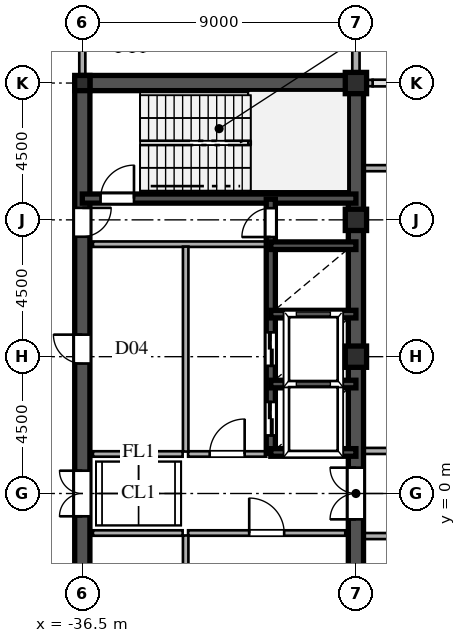
"""IFC4 building model, lengths in metres.
Left out: names, types, materials, properties, quantities, classifications, styles, units other than length and angle.
Written with IfcOpenShell. Run it as: python <this file> out.ifc"""

import sys

from ifc_helpers import new_model, si_unit, direction, frame, frame_2d, origin, origin_2d, place, context, subcontext, project, spatial, rectangle, hollow_rectangle, i_section, extrude, source, transform, mapped, element, fill, save


model = new_model("IFC4")
c1 = context("Model", 3, precision=1e-05, world=origin(), true_north=direction((0.0, 1.0)))
c2 = subcontext(c1, "Body", "Model", "MODEL_VIEW")
j1 = project(units=[si_unit("LENGTHUNIT", "METRE"), si_unit("PLANEANGLEUNIT", "RADIAN")], contexts=[c1])
p1 = place(None, origin())
s1 = spatial("IfcSite", under=j1, at=p1, CompositionType="ELEMENT")
p2 = place(p1, origin())
s2 = spatial("IfcBuilding", under=s1, at=p2, CompositionType="ELEMENT")
p3 = place(p2, frame((0.0, 0.0, 229.8)))
s3 = spatial("IfcBuildingStorey", under=s2, at=p3, CompositionType="ELEMENT", Elevation=229.8)
m1 = source(origin(), c2, "Body", "SweptSolid", [
    extrude(hollow_rectangle(XDim=0.7, YDim=0.7, WallThickness=0.03, at=origin_2d()), origin(), (0.0, 0.0, 1.0), 4.8),
])
for number, where, z_axis, x_axis in (
    (1, (-27.5, 4.5, 0.0), (0.0, 0.0, 1.0), (1.0, 0.0, 0.0)),
    (2, (-27.5, 9.0, 0.0), (0.0, 0.0, 1.0), (1.0, 0.0, 0.0)),
    (3, (-27.5, 13.5, 0.0), (0.0, 0.0, 1.0), (1.0, 0.0, 0.0)),
):
    element("IfcColumn", number, at=place(p3, frame(where, z_axis=z_axis, x_axis=x_axis)), inside=s3, PredefinedType="COLUMN", context=c2, shape_type="MappedRepresentation", body=[
        mapped(m1, transform((0.0, 0.0, 0.0), scale=1.0)),
    ])
m2 = source(origin(), c2, "Body", "SweptSolid", [
    extrude(i_section(OverallWidth=0.5, OverallDepth=0.5, WebThickness=0.02, FlangeThickness=0.032, at=origin_2d()), origin(), (0.0, 0.0, 1.0), 4.8),
])
p4 = place(p3, frame((-36.5, 13.5, 0.0), z_axis=(0.0, 0.0, 1.0), x_axis=(1.0, 0.0, 0.0)))
e4 = element("IfcColumn", 4, at=p4, inside=s3, PredefinedType="COLUMN", context=c2, shape_type="MappedRepresentation", body=[
    mapped(m2, transform((0.0, 0.0, 0.0), scale=1.0)),
])
p5 = place(p3, frame((-27.5, 13.755, 0.0), z_axis=(0.0, 0.0, 1.0), x_axis=(0.0, 1.0, 0.0)))
e5 = element("IfcWall", 5, at=p5, inside=s3, PredefinedType="SOLIDWALL", context=c2, shape_type="SweptSolid", body=[
    extrude(rectangle(XDim=0.62, YDim=0.24, at=frame_2d((0.31, 0.0))), origin(), (0.0, 0.0, 1.0), 4.04),
])
p6 = place(p3, frame((-27.5, 14.375, 0.0), z_axis=(0.0, 0.0, 1.0), x_axis=(0.0, 1.0, 0.0)))
e6 = element("IfcWall", 6, at=p6, inside=s3, PredefinedType="SOLIDWALL", context=c2, shape_type="SweptSolid", body=[
    extrude(rectangle(XDim=1.605, YDim=0.24, at=frame_2d((0.803, 0.0))), origin(), (0.0, 0.0, 1.0), 4.54),
])
p7 = place(p3, frame((-27.49, 13.5, 0.0), z_axis=(0.0, 0.0, 1.0), x_axis=(1.0, 0.0, 0.0)))
e7 = element("IfcWall", 7, at=p7, inside=s3, PredefinedType="SOLIDWALL", context=c2, shape_type="SweptSolid", body=[
    extrude(rectangle(XDim=0.54, YDim=0.21, at=frame_2d((0.27, 0.0))), origin(), (0.0, 0.0, 1.0), 2.54),
])
for number, where, z_axis, x_axis in (
    (8, (-27.5, -13.5, 0.0), (0.0, 0.0, 1.0), (0.0, 1.0, 0.0)),
    (9, (-27.5, 1.3, 0.0), (0.0, 0.0, 1.0), (0.0, 1.0, 0.0)),
):
    element("IfcWall", number, at=place(p3, frame(where, z_axis=z_axis, x_axis=x_axis)), inside=s3, PredefinedType="SHEAR", context=c2, shape_type="SweptSolid", body=[
        extrude(rectangle(XDim=12.2, YDim=0.5, at=frame_2d((6.1, 0.0))), origin(), (0.0, 0.0, 1.0), 4.54),
    ])
p8 = place(p3, frame((-27.5, -1.3, 0.0), z_axis=(0.0, 0.0, 1.0), x_axis=(0.0, 1.0, 0.0)))
e10 = element("IfcWall", 10, at=p8, inside=s3, PredefinedType="SHEAR", context=c2, shape_type="SweptSolid", body=[
    extrude(rectangle(XDim=2.6, YDim=0.5, at=frame_2d((1.3, 0.0))), origin(), (0.0, 0.0, 1.0), 4.54),
])
p9 = place(p8, frame((0.45, 0.0, 0.0)))
e11 = element("IfcOpeningElement", 11, at=p9, cuts=e10, PredefinedType="OPENING", context=c2, shape_type="SweptSolid", body=[
    extrude(rectangle(XDim=1.7, YDim=2.35, at=frame_2d((0.85, 1.175))), frame((0.0, 0.26, 0.0), z_axis=(0.0, -1.0, 0.0), x_axis=(1.0, 0.0, 0.0)), (0.0, 0.0, 1.0), 0.52),
])
p10 = place(p3, frame((-36.5, 13.5, 0.0), z_axis=(0.0, 0.0, 1.0), x_axis=(1.0, 0.0, 0.0)))
e12 = element("IfcWall", 12, at=p10, inside=s3, PredefinedType="SHEAR", context=c2, shape_type="SweptSolid", body=[
    extrude(rectangle(XDim=9.0, YDim=0.5, at=frame_2d((4.5, 0.0))), origin(), (0.0, 0.0, 1.0), 4.54),
])
p11 = place(p3, frame((-36.5, -1.3, 0.0), z_axis=(0.0, 0.0, 1.0), x_axis=(0.0, 1.0, 0.0)))
e13 = element("IfcWall", 13, at=p11, inside=s3, PredefinedType="SHEAR", context=c2, shape_type="SweptSolid", body=[
    extrude(rectangle(XDim=2.6, YDim=0.5, at=frame_2d((1.3, 0.0))), origin(), (0.0, 0.0, 1.0), 4.54),
])
p12 = place(p11, frame((0.55, 0.0, 0.0)))
e14 = element("IfcOpeningElement", 14, at=p12, cuts=e13, PredefinedType="OPENING", context=c2, shape_type="SweptSolid", body=[
    extrude(rectangle(XDim=1.5, YDim=2.3, at=frame_2d((0.75, 1.15))), frame((0.0, 0.26, 0.0), z_axis=(0.0, -1.0, 0.0), x_axis=(1.0, 0.0, 0.0)), (0.0, 0.0, 1.0), 0.52),
])
p13 = place(p3, frame((-36.5, 8.2, 0.0), z_axis=(0.0, 0.0, 1.0), x_axis=(0.0, 1.0, 0.0)))
e15 = element("IfcWall", 15, at=p13, inside=s3, PredefinedType="SHEAR", context=c2, shape_type="SweptSolid", body=[
    extrude(rectangle(XDim=5.45, YDim=0.5, at=frame_2d((2.725, 0.0))), origin(), (0.0, 0.0, 1.0), 4.54),
])
p14 = place(p13, frame((0.245, 0.0, 0.0)))
e16 = element("IfcOpeningElement", 16, at=p14, cuts=e15, PredefinedType="OPENING", context=c2, shape_type="SweptSolid", body=[
    extrude(rectangle(XDim=0.95, YDim=2.15, at=frame_2d((0.475, 1.075))), frame((0.0, 0.26, 0.0), z_axis=(0.0, -1.0, 0.0), x_axis=(1.0, 0.0, 0.0)), (0.0, 0.0, 1.0), 0.52),
])
p15 = place(p3, frame((-36.5, -6.5, 0.0), z_axis=(0.0, 0.0, 1.0), x_axis=(0.0, 1.0, 0.0)))
e17 = element("IfcWall", 17, at=p15, inside=s3, PredefinedType="SHEAR", context=c2, shape_type="SweptSolid", body=[
    extrude(rectangle(XDim=5.2, YDim=0.5, at=frame_2d((2.6, 0.0))), origin(), (0.0, 0.0, 1.0), 4.54),
])
p16 = place(p15, frame((2.125, 0.0, 0.0)))
e18 = element("IfcOpeningElement", 18, at=p16, cuts=e17, PredefinedType="OPENING", context=c2, shape_type="SweptSolid", body=[
    extrude(rectangle(XDim=0.95, YDim=2.15, at=frame_2d((0.475, 1.075))), frame((0.0, 0.26, 0.0), z_axis=(0.0, -1.0, 0.0), x_axis=(1.0, 0.0, 0.0)), (0.0, 0.0, 1.0), 0.52),
])
p17 = place(p3, frame((-36.5, 1.3, 0.0), z_axis=(0.0, 0.0, 1.0), x_axis=(0.0, 1.0, 0.0)))
e19 = element("IfcWall", 19, at=p17, inside=s3, PredefinedType="SHEAR", context=c2, shape_type="SweptSolid", body=[
    extrude(rectangle(XDim=6.9, YDim=0.5, at=frame_2d((3.45, 0.0))), origin(), (0.0, 0.0, 1.0), 4.54),
])
p18 = place(p17, frame((2.975, 0.0, 0.0)))
e20 = element("IfcOpeningElement", 20, at=p18, cuts=e19, PredefinedType="OPENING", context=c2, shape_type="SweptSolid", body=[
    extrude(rectangle(XDim=0.95, YDim=2.15, at=frame_2d((0.475, 1.075))), frame((0.0, 0.26, 0.0), z_axis=(0.0, -1.0, 0.0), x_axis=(1.0, 0.0, 0.0)), (0.0, 0.0, 1.0), 0.52),
])
p19 = place(p3, frame((-36.5, 9.7, 0.0), z_axis=(0.0, 0.0, 1.0), x_axis=(1.0, 0.0, 0.0)))
e21 = element("IfcWall", 21, at=p19, inside=s3, PredefinedType="SHEAR", context=c2, shape_type="SweptSolid", body=[
    extrude(rectangle(XDim=9.0, YDim=0.3, at=frame_2d((4.5, 0.0))), origin(), (0.0, 0.0, 1.0), 4.54),
])
p20 = place(p19, frame((0.6, 0.0, 0.0)))
e22 = element("IfcOpeningElement", 22, at=p20, cuts=e21, PredefinedType="OPENING", context=c2, shape_type="SweptSolid", body=[
    extrude(rectangle(XDim=1.1, YDim=2.2, at=frame_2d((0.55, 1.1))), frame((0.0, 0.16, 0.0), z_axis=(0.0, -1.0, 0.0), x_axis=(1.0, 0.0, 0.0)), (0.0, 0.0, 1.0), 0.32),
])
for number, where, z_axis, x_axis in (
    (23, (-30.3, 1.35, 0.0), (0.0, 0.0, 1.0), (1.0, 0.0, 0.0)),
    (24, (-30.3, 3.6, 0.0), (0.0, 0.0, 1.0), (1.0, 0.0, 0.0)),
    (25, (-30.3, 5.9, 0.0), (0.0, 0.0, 1.0), (1.0, 0.0, 0.0)),
    (26, (-30.3, 8.15, 0.0), (0.0, 0.0, 1.0), (1.0, 0.0, 0.0)),
):
    element("IfcWall", number, at=place(p3, frame(where, z_axis=z_axis, x_axis=x_axis)), inside=s3, PredefinedType="SHEAR", context=c2, shape_type="SweptSolid", body=[
        extrude(rectangle(XDim=2.8, YDim=0.25, at=frame_2d((1.4, 0.0))), origin(), (0.0, 0.0, 1.0), 4.54),
    ])
p21 = place(p3, frame((-30.3, 1.32, 0.0), z_axis=(0.0, 0.0, 1.0), x_axis=(0.0, 1.0, 0.0)))
e27 = element("IfcWall", 27, at=p21, inside=s3, PredefinedType="SHEAR", context=c2, shape_type="SweptSolid", body=[
    extrude(rectangle(XDim=2.28, YDim=0.3, at=frame_2d((1.14, 0.0))), origin(), (0.0, 0.0, 1.0), 4.54),
])
p22 = place(p21, frame((0.59, 0.0, 0.0)))
e28 = element("IfcOpeningElement", 28, at=p22, cuts=e27, PredefinedType="OPENING", context=c2, shape_type="SweptSolid", body=[
    extrude(rectangle(XDim=1.1, YDim=2.2, at=frame_2d((0.55, 1.1))), frame((0.0, 0.16, 0.0), z_axis=(0.0, -1.0, 0.0), x_axis=(1.0, 0.0, 0.0)), (0.0, 0.0, 1.0), 0.32),
])
p23 = place(p3, frame((-30.3, 3.6, 0.0), z_axis=(0.0, 0.0, 1.0), x_axis=(0.0, 1.0, 0.0)))
e29 = element("IfcWall", 29, at=p23, inside=s3, PredefinedType="SHEAR", context=c2, shape_type="SweptSolid", body=[
    extrude(rectangle(XDim=2.3, YDim=0.3, at=frame_2d((1.15, 0.0))), origin(), (0.0, 0.0, 1.0), 4.54),
])
p24 = place(p23, frame((0.6, 0.0, 0.0)))
e30 = element("IfcOpeningElement", 30, at=p24, cuts=e29, PredefinedType="OPENING", context=c2, shape_type="SweptSolid", body=[
    extrude(rectangle(XDim=1.1, YDim=2.2, at=frame_2d((0.55, 1.1))), frame((0.0, 0.16, 0.0), z_axis=(0.0, -1.0, 0.0), x_axis=(1.0, 0.0, 0.0)), (0.0, 0.0, 1.0), 0.32),
])
p25 = place(p3, frame((-30.3, 5.9, 0.0), z_axis=(0.0, 0.0, 1.0), x_axis=(0.0, 1.0, 0.0)))
e31 = element("IfcWall", 31, at=p25, inside=s3, PredefinedType="SHEAR", context=c2, shape_type="SweptSolid", body=[
    extrude(rectangle(XDim=2.25, YDim=0.3, at=frame_2d((1.125, 0.0))), origin(), (0.0, 0.0, 1.0), 4.54),
])
p26 = place(p3, frame((-30.3, 8.15, 0.0), z_axis=(0.0, 0.0, 1.0), x_axis=(0.0, 1.0, 0.0)))
e32 = element("IfcWall", 32, at=p26, inside=s3, PredefinedType="SHEAR", context=c2, shape_type="SweptSolid", body=[
    extrude(rectangle(XDim=1.53, YDim=0.3, at=frame_2d((0.765, 0.0))), origin(), (0.0, 0.0, 1.0), 4.54),
])
p27 = place(p26, frame((0.285, 0.0, 0.0)))
e33 = element("IfcOpeningElement", 33, at=p27, cuts=e32, PredefinedType="OPENING", context=c2, shape_type="SweptSolid", body=[
    extrude(rectangle(XDim=0.95, YDim=2.15, at=frame_2d((0.475, 1.075))), frame((0.0, 0.16, 0.0), z_axis=(0.0, -1.0, 0.0), x_axis=(1.0, 0.0, 0.0)), (0.0, 0.0, 1.0), 0.32),
])
p28 = place(p3, frame((-36.15, 8.2, 0.0), z_axis=(0.0, 0.0, 1.0), x_axis=(1.0, 0.0, 0.0)))
e34 = element("IfcWall", 34, at=p28, inside=s3, PredefinedType="PARTITIONING", context=c2, shape_type="SweptSolid", body=[
    extrude(rectangle(XDim=5.7, YDim=0.18, at=frame_2d((2.85, 0.0))), origin(), (0.0, 0.0, 1.0), 4.54),
])
p29 = place(p3, frame((-33.1, -6.42, 0.0), z_axis=(0.0, 0.0, 1.0), x_axis=(0.0, 1.0, 0.0)))
e35 = element("IfcWall", 35, at=p29, inside=s3, PredefinedType="PARTITIONING", context=c2, shape_type="SweptSolid", body=[
    extrude(rectangle(XDim=5.04, YDim=0.18, at=frame_2d((2.52, 0.0))), origin(), (0.0, 0.0, 1.0), 4.54),
])
p30 = place(p3, frame((-33.1, 1.38, 0.0), z_axis=(0.0, 0.0, 1.0), x_axis=(0.0, 1.0, 0.0)))
e36 = element("IfcWall", 36, at=p30, inside=s3, PredefinedType="PARTITIONING", context=c2, shape_type="SweptSolid", body=[
    extrude(rectangle(XDim=6.74, YDim=0.18, at=frame_2d((3.37, 0.0))), origin(), (0.0, 0.0, 1.0), 4.54),
])
p31 = place(p3, frame((-33.02, -1.3, 0.0), z_axis=(0.0, 0.0, 1.0), x_axis=(1.0, 0.0, 0.0)))
e37 = element("IfcWall", 37, at=p31, inside=s3, PredefinedType="PARTITIONING", context=c2, shape_type="SweptSolid", body=[
    extrude(rectangle(XDim=5.17, YDim=0.18, at=frame_2d((2.585, 0.0))), origin(), (0.0, 0.0, 1.0), 4.54),
])
p32 = place(p31, frame((2.01, 0.0, 0.0)))
e38 = element("IfcOpeningElement", 38, at=p32, cuts=e37, PredefinedType="OPENING", context=c2, shape_type="SweptSolid", body=[
    extrude(rectangle(XDim=1.15, YDim=2.2, at=frame_2d((0.575, 1.1))), frame((0.0, 0.1, 0.0), z_axis=(0.0, -1.0, 0.0), x_axis=(1.0, 0.0, 0.0)), (0.0, 0.0, 1.0), 0.2),
])
p33 = place(p3, frame((-33.02, 1.3, 0.0), z_axis=(0.0, 0.0, 1.0), x_axis=(1.0, 0.0, 0.0)))
e39 = element("IfcWall", 39, at=p33, inside=s3, PredefinedType="PARTITIONING", context=c2, shape_type="SweptSolid", body=[
    extrude(rectangle(XDim=2.57, YDim=0.18, at=frame_2d((1.285, 0.0))), origin(), (0.0, 0.0, 1.0), 4.54),
])
p34 = place(p33, frame((0.71, 0.0, 0.0)))
e40 = element("IfcOpeningElement", 40, at=p34, cuts=e39, PredefinedType="OPENING", context=c2, shape_type="SweptSolid", body=[
    extrude(rectangle(XDim=1.15, YDim=2.2, at=frame_2d((0.575, 1.1))), frame((0.0, 0.1, 0.0), z_axis=(0.0, -1.0, 0.0), x_axis=(1.0, 0.0, 0.0)), (0.0, 0.0, 1.0), 0.2),
])
for number, where, z_axis, x_axis in (
    (41, (-36.15, -1.3, 0.0), (0.0, 0.0, 1.0), (1.0, 0.0, 0.0)),
    (42, (-36.15, 1.3, 0.0), (0.0, 0.0, 1.0), (1.0, 0.0, 0.0)),
):
    element("IfcWall", number, at=place(p3, frame(where, z_axis=z_axis, x_axis=x_axis)), inside=s3, PredefinedType="PARTITIONING", context=c2, shape_type="SweptSolid", body=[
        extrude(rectangle(XDim=2.95, YDim=0.18, at=frame_2d((1.475, 0.0))), origin(), (0.0, 0.0, 1.0), 4.54),
    ])
p35 = place(p3, frame((-27.245, -1.4, 0.0), z_axis=(0.0, 0.0, 1.0), x_axis=(1.0, 0.0, 0.0)))
e43 = element("IfcWall", 43, at=p35, inside=s3, PredefinedType="PARTITIONING", context=c2, shape_type="SweptSolid", body=[
    extrude(rectangle(XDim=54.49, YDim=0.2, at=frame_2d((27.245, 0.0))), origin(), (0.0, 0.0, 1.0), 4.54),
])
p36 = place(p35, frame((25.77, 0.0, 0.0)))
e44 = element("IfcOpeningElement", 44, at=p36, cuts=e43, PredefinedType="OPENING", context=c2, shape_type="SweptSolid", body=[
    extrude(rectangle(XDim=1.15, YDim=2.2, at=frame_2d((0.575, 1.1))), frame((0.0, 0.11, 0.0), z_axis=(0.0, -1.0, 0.0), x_axis=(1.0, 0.0, 0.0)), (0.0, 0.0, 1.0), 0.22),
])
p37 = place(p35, frame((17.67, 0.0, 0.0)))
e45 = element("IfcOpeningElement", 45, at=p37, cuts=e43, PredefinedType="OPENING", context=c2, shape_type="SweptSolid", body=[
    extrude(rectangle(XDim=1.15, YDim=2.2, at=frame_2d((0.575, 1.1))), frame((0.0, 0.11, 0.0), z_axis=(0.0, -1.0, 0.0), x_axis=(1.0, 0.0, 0.0)), (0.0, 0.0, 1.0), 0.22),
])
p38 = place(p35, frame((35.17, 0.0, 0.0)))
e46 = element("IfcOpeningElement", 46, at=p38, cuts=e43, PredefinedType="OPENING", context=c2, shape_type="SweptSolid", body=[
    extrude(rectangle(XDim=1.15, YDim=2.2, at=frame_2d((0.575, 1.1))), frame((0.0, 0.11, 0.0), z_axis=(0.0, -1.0, 0.0), x_axis=(1.0, 0.0, 0.0)), (0.0, 0.0, 1.0), 0.22),
])
p39 = place(p3, frame((-27.245, 1.4, 0.0), z_axis=(0.0, 0.0, 1.0), x_axis=(1.0, 0.0, 0.0)))
e47 = element("IfcWall", 47, at=p39, inside=s3, PredefinedType="PARTITIONING", context=c2, shape_type="SweptSolid", body=[
    extrude(rectangle(XDim=54.49, YDim=0.2, at=frame_2d((27.245, 0.0))), origin(), (0.0, 0.0, 1.0), 4.54),
])
p40 = place(p39, frame((25.77, 0.0, 0.0)))
e48 = element("IfcOpeningElement", 48, at=p40, cuts=e47, PredefinedType="OPENING", context=c2, shape_type="SweptSolid", body=[
    extrude(rectangle(XDim=1.15, YDim=2.2, at=frame_2d((0.575, 1.1))), frame((0.0, 0.11, 0.0), z_axis=(0.0, -1.0, 0.0), x_axis=(1.0, 0.0, 0.0)), (0.0, 0.0, 1.0), 0.22),
])
p41 = place(p39, frame((35.17, 0.0, 0.0)))
e49 = element("IfcOpeningElement", 49, at=p41, cuts=e47, PredefinedType="OPENING", context=c2, shape_type="SweptSolid", body=[
    extrude(rectangle(XDim=1.15, YDim=2.2, at=frame_2d((0.575, 1.1))), frame((0.0, 0.11, 0.0), z_axis=(0.0, -1.0, 0.0), x_axis=(1.0, 0.0, 0.0)), (0.0, 0.0, 1.0), 0.22),
])
p42 = place(p39, frame((17.67, 0.0, 0.0)))
e50 = element("IfcOpeningElement", 50, at=p42, cuts=e47, PredefinedType="OPENING", context=c2, shape_type="SweptSolid", body=[
    extrude(rectangle(XDim=1.15, YDim=2.2, at=frame_2d((0.575, 1.1))), frame((0.0, 0.11, 0.0), z_axis=(0.0, -1.0, 0.0), x_axis=(1.0, 0.0, 0.0)), (0.0, 0.0, 1.0), 0.22),
])
p43 = place(p39, frame((46.055, 0.0, 0.0)))
e51 = element("IfcOpeningElement", 51, at=p43, cuts=e47, PredefinedType="OPENING", context=c2, shape_type="SweptSolid", body=[
    extrude(rectangle(XDim=0.88, YDim=2.1, at=frame_2d((0.44, 1.05))), frame((0.0, 0.11, 0.0), z_axis=(0.0, -1.0, 0.0), x_axis=(1.0, 0.0, 0.0)), (0.0, 0.0, 1.0), 0.22),
])
p44 = place(p39, frame((51.405, 0.0, 0.0)))
e52 = element("IfcOpeningElement", 52, at=p44, cuts=e47, PredefinedType="OPENING", context=c2, shape_type="SweptSolid", body=[
    extrude(rectangle(XDim=0.88, YDim=2.1, at=frame_2d((0.44, 1.05))), frame((0.0, 0.11, 0.0), z_axis=(0.0, -1.0, 0.0), x_axis=(1.0, 0.0, 0.0)), (0.0, 0.0, 1.0), 0.22),
])
p45 = place(p3, frame((-27.245, 10.7, 0.0), z_axis=(0.0, 0.0, 1.0), x_axis=(1.0, 0.0, 0.0)))
e53 = element("IfcWall", 53, at=p45, inside=s3, PredefinedType="PARTITIONING", context=c2, shape_type="SweptSolid", body=[
    extrude(rectangle(XDim=54.49, YDim=0.2, at=frame_2d((27.245, 0.0))), origin(), (0.0, 0.0, 1.0), 4.54),
])
p46 = place(p45, frame((25.77, 0.0, 0.0)))
e54 = element("IfcOpeningElement", 54, at=p46, cuts=e53, PredefinedType="OPENING", context=c2, shape_type="SweptSolid", body=[
    extrude(rectangle(XDim=1.15, YDim=2.2, at=frame_2d((0.575, 1.1))), frame((0.0, 0.11, 0.0), z_axis=(0.0, -1.0, 0.0), x_axis=(1.0, 0.0, 0.0)), (0.0, 0.0, 1.0), 0.22),
])
p47 = place(p3, frame((-36.5, 13.755, 0.0), z_axis=(0.0, 0.0, 1.0), x_axis=(0.0, 1.0, 0.0)))
e55 = element("IfcWall", 55, at=p47, inside=s3, PredefinedType="PARTITIONING", context=c2, shape_type="SweptSolid", body=[
    extrude(rectangle(XDim=1.76, YDim=0.2, at=frame_2d((0.88, 0.0))), origin(), (0.0, 0.0, 1.0), 3.94),
])
m3 = source(origin(), c2, "Body", "SweptSolid", [
    extrude(rectangle(XDim=1.7, YDim=2.35, at=frame_2d((0.85, 1.175))), frame((0.0, 0.025, 0.0), z_axis=(0.0, -1.0, 0.0), x_axis=(1.0, 0.0, 0.0)), (0.0, 0.0, 1.0), 0.05),
])
p48 = place(p9, origin())
e56 = element("IfcDoor", 56, at=p48, inside=s3, OperationType="DOUBLE_SWING_LEFT", PredefinedType="DOOR", context=c2, shape_type="MappedRepresentation", body=[
    mapped(m3, transform((0.0, 0.0, 0.0), scale=1.0)),
])
fill(e11, e56)
m4 = source(origin(), c2, "Body", "SweptSolid", [
    extrude(rectangle(XDim=1.5, YDim=2.3, at=frame_2d((0.75, 1.15))), frame((0.0, 0.025, 0.0), z_axis=(0.0, -1.0, 0.0), x_axis=(1.0, 0.0, 0.0)), (0.0, 0.0, 1.0), 0.05),
])
p49 = place(p12, origin())
e57 = element("IfcDoor", 57, at=p49, inside=s3, OperationType="DOUBLE_SWING_LEFT", PredefinedType="DOOR", context=c2, shape_type="MappedRepresentation", body=[
    mapped(m4, transform((0.0, 0.0, 0.0), scale=1.0)),
])
fill(e14, e57)
m5 = source(origin(), c2, "Body", "SweptSolid", [
    extrude(rectangle(XDim=0.95, YDim=2.15, at=frame_2d((0.475, 1.075))), frame((0.0, 0.025, 0.0), z_axis=(0.0, -1.0, 0.0), x_axis=(1.0, 0.0, 0.0)), (0.0, 0.0, 1.0), 0.05),
])
p50 = place(p14, frame((0.95, 0.0, 0.0), z_axis=(0.0, 0.0, 1.0), x_axis=(-1.0, 0.0, 0.0)))
e58 = element("IfcDoor", 58, at=p50, inside=s3, OperationType="SINGLE_SWING_RIGHT", PredefinedType="DOOR", context=c2, shape_type="MappedRepresentation", body=[
    mapped(m5, transform((0.0, 0.0, 0.0), scale=1.0)),
])
fill(e16, e58)
p51 = place(p18, origin())
e59 = element("IfcDoor", 59, at=p51, inside=s3, OperationType="SINGLE_SWING_RIGHT", PredefinedType="DOOR", context=c2, shape_type="MappedRepresentation", body=[
    mapped(m5, transform((0.0, 0.0, 0.0), scale=1.0)),
])
fill(e20, e59)
m6 = source(origin(), c2, "Body", "SweptSolid", [
    extrude(rectangle(XDim=1.1, YDim=2.2, at=frame_2d((0.55, 1.1))), frame((0.0, 0.025, 0.0), z_axis=(0.0, -1.0, 0.0), x_axis=(1.0, 0.0, 0.0)), (0.0, 0.0, 1.0), 0.05),
])
p52 = place(p20, origin())
e60 = element("IfcDoor", 60, at=p52, inside=s3, OperationType="SINGLE_SWING_RIGHT", PredefinedType="DOOR", context=c2, shape_type="MappedRepresentation", body=[
    mapped(m6, transform((0.0, 0.0, 0.0), scale=1.0)),
])
fill(e22, e60)
m7 = source(origin(), c2, "Body", "SweptSolid", [
    extrude(rectangle(XDim=1.1, YDim=2.2, at=frame_2d((0.55, 1.1))), frame((0.0, 0.025, 0.0), z_axis=(0.0, -1.0, 0.0), x_axis=(1.0, 0.0, 0.0)), (0.0, 0.0, 1.0), 0.05),
])
p53 = place(p22, origin())
e61 = element("IfcDoor", 61, at=p53, inside=s3, OperationType="DOUBLE_DOOR_SLIDING", PredefinedType="DOOR", context=c2, shape_type="MappedRepresentation", body=[
    mapped(m7, transform((0.0, 0.0, 0.0), scale=1.0)),
])
fill(e28, e61)
p54 = place(p24, origin())
e62 = element("IfcDoor", 62, at=p54, inside=s3, OperationType="DOUBLE_DOOR_SLIDING", PredefinedType="DOOR", context=c2, shape_type="MappedRepresentation", body=[
    mapped(m7, transform((0.0, 0.0, 0.0), scale=1.0)),
])
fill(e30, e62)
p55 = place(p27, origin())
e63 = element("IfcDoor", 63, at=p55, inside=s3, OperationType="SINGLE_SWING_LEFT", PredefinedType="DOOR", context=c2, shape_type="MappedRepresentation", body=[
    mapped(m5, transform((0.0, 0.0, 0.0), scale=1.0)),
])
fill(e33, e63)
m8 = source(origin(), c2, "Body", "SweptSolid", [
    extrude(rectangle(XDim=1.15, YDim=2.2, at=frame_2d((0.575, 1.1))), frame((0.0, 0.025, 0.0), z_axis=(0.0, -1.0, 0.0), x_axis=(1.0, 0.0, 0.0)), (0.0, 0.0, 1.0), 0.05),
])
p56 = place(p32, origin())
e64 = element("IfcDoor", 64, at=p56, inside=s3, OperationType="SINGLE_SWING_LEFT", PredefinedType="DOOR", context=c2, shape_type="MappedRepresentation", body=[
    mapped(m8, transform((0.0, 0.0, 0.0), scale=1.0)),
])
fill(e38, e64)
p57 = place(p34, origin())
e65 = element("IfcDoor", 65, at=p57, inside=s3, OperationType="SINGLE_SWING_RIGHT", PredefinedType="DOOR", context=c2, shape_type="MappedRepresentation", body=[
    mapped(m8, transform((0.0, 0.0, 0.0), scale=1.0)),
])
fill(e40, e65)
save(model, sys.argv[1])
